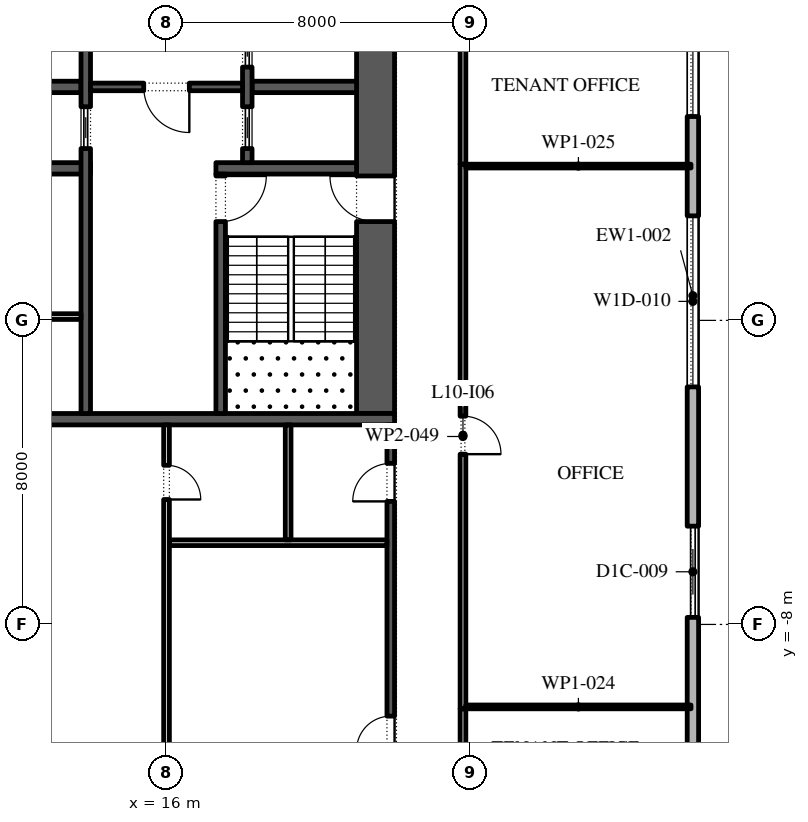
"""IFC4 building model, lengths in metres.
Left out: names, types, materials, properties, quantities, classifications, styles, units other than length and angle.
Written with IfcOpenShell. Run it as: python <this file> out.ifc"""

import sys

from ifc_helpers import new_model, si_unit, direction, frame, frame_2d, origin, place, context, subcontext, project, spatial, rectangle, extrude, element, fill, save


model = new_model("IFC4")
c1 = context("Model", 3, precision=1e-05, world=origin(), true_north=direction((0.0, 1.0)))
c2 = subcontext(c1, "Body", "Model", "MODEL_VIEW")
j1 = project(units=[si_unit("LENGTHUNIT", "METRE"), si_unit("PLANEANGLEUNIT", "RADIAN")], contexts=[c1])
p1 = place(None, origin())
s1 = spatial("IfcSite", under=j1, at=p1, CompositionType="ELEMENT")
p2 = place(p1, origin())
s2 = spatial("IfcBuilding", under=s1, at=p2, CompositionType="ELEMENT")
p3 = place(p2, frame((0.0, 0.0, 52.2)))
s3 = spatial("IfcBuildingStorey", under=s2, at=p3, CompositionType="ELEMENT", Elevation=52.2)
p4 = place(p3, frame((29.85, -24.1, 0.0), z_axis=(0.0, 0.0, 1.0), x_axis=(0.0, 1.0, 0.0)))
e1 = element("IfcWall", 1, at=p4, inside=s3, PredefinedType="STANDARD", context=c2, shape_type="SweptSolid", body=[
    extrude(rectangle(XDim=49.5, YDim=0.3, at=frame_2d((24.75, 0.0))), origin(), (0.0, 0.0, 1.0), 4.0),
])
p5 = place(p4, frame((1.157, 0.0, 0.45)))
e2 = element("IfcOpeningElement", 2, at=p5, cuts=e1, PredefinedType="OPENING", context=c2, shape_type="SweptSolid", body=[
    extrude(rectangle(XDim=4.5, YDim=3.05, at=frame_2d((2.25, 1.525))), frame((0.0, 0.16, 0.0), z_axis=(0.0, -1.0, 0.0), x_axis=(1.0, 0.0, 0.0)), (0.0, 0.0, 1.0), 0.32),
])
p6 = place(p4, frame((8.121, 0.0, 0.45)))
e3 = element("IfcOpeningElement", 3, at=p6, cuts=e1, PredefinedType="OPENING", context=c2, shape_type="SweptSolid", body=[
    extrude(rectangle(XDim=4.5, YDim=2.825, at=frame_2d((2.25, 1.413))), frame((0.0, 0.16, 0.0), z_axis=(0.0, -1.0, 0.0), x_axis=(1.0, 0.0, 0.0)), (0.0, 0.0, 1.0), 0.32),
])
p7 = place(p4, frame((16.286, 0.0, 0.0)))
e4 = element("IfcOpeningElement", 4, at=p7, cuts=e1, PredefinedType="OPENING", context=c2, shape_type="SweptSolid", body=[
    extrude(rectangle(XDim=2.4, YDim=3.325, at=frame_2d((1.2, 1.663))), frame((0.0, 0.16, 0.0), z_axis=(0.0, -1.0, 0.0), x_axis=(1.0, 0.0, 0.0)), (0.0, 0.0, 1.0), 0.32),
])
p8 = place(p4, frame((22.35, 0.0, 0.45)))
e5 = element("IfcOpeningElement", 5, at=p8, cuts=e1, PredefinedType="OPENING", context=c2, shape_type="SweptSolid", body=[
    extrude(rectangle(XDim=4.5, YDim=2.875, at=frame_2d((2.25, 1.438))), frame((0.0, 0.16, 0.0), z_axis=(0.0, -1.0, 0.0), x_axis=(1.0, 0.0, 0.0)), (0.0, 0.0, 1.0), 0.32),
])
p9 = place(p4, frame((29.464, 0.0, 0.45)))
e6 = element("IfcOpeningElement", 6, at=p9, cuts=e1, PredefinedType="OPENING", context=c2, shape_type="SweptSolid", body=[
    extrude(rectangle(XDim=4.5, YDim=2.875, at=frame_2d((2.25, 1.438))), frame((0.0, 0.16, 0.0), z_axis=(0.0, -1.0, 0.0), x_axis=(1.0, 0.0, 0.0)), (0.0, 0.0, 1.0), 0.32),
])
p10 = place(p4, frame((36.579, 0.0, 0.45)))
e7 = element("IfcOpeningElement", 7, at=p10, cuts=e1, PredefinedType="OPENING", context=c2, shape_type="SweptSolid", body=[
    extrude(rectangle(XDim=4.5, YDim=3.05, at=frame_2d((2.25, 1.525))), frame((0.0, 0.16, 0.0), z_axis=(0.0, -1.0, 0.0), x_axis=(1.0, 0.0, 0.0)), (0.0, 0.0, 1.0), 0.32),
])
p11 = place(p4, frame((44.743, 0.0, 0.0)))
e8 = element("IfcOpeningElement", 8, at=p11, cuts=e1, PredefinedType="OPENING", context=c2, shape_type="SweptSolid", body=[
    extrude(rectangle(XDim=2.4, YDim=3.325, at=frame_2d((1.2, 1.663))), frame((0.0, 0.16, 0.0), z_axis=(0.0, -1.0, 0.0), x_axis=(1.0, 0.0, 0.0)), (0.0, 0.0, 1.0), 0.32),
])
p12 = place(p3, frame((21.5, -2.45, 0.0), z_axis=(0.0, 0.0, 1.0), x_axis=(0.0, 1.0, 0.0)))
e9 = element("IfcWall", 9, at=p12, inside=s3, PredefinedType="SHEAR", context=c2, shape_type="SweptSolid", body=[
    extrude(rectangle(XDim=27.9, YDim=1.0, at=frame_2d((13.95, 0.0))), origin(), (0.0, 0.0, 1.0), 4.0),
])
p13 = place(p12, frame((5.05, 0.0, 0.0)))
e10 = element("IfcOpeningElement", 10, at=p13, cuts=e9, PredefinedType="OPENING", context=c2, shape_type="SweptSolid", body=[
    extrude(rectangle(XDim=1.2, YDim=2.1, at=frame_2d((0.6, 1.05))), frame((0.0, 0.51, 0.0), z_axis=(0.0, -1.0, 0.0), x_axis=(1.0, 0.0, 0.0)), (0.0, 0.0, 1.0), 1.02),
])
p14 = place(p12, frame((21.65, 0.0, 0.0)))
e11 = element("IfcOpeningElement", 11, at=p14, cuts=e9, PredefinedType="OPENING", context=c2, shape_type="SweptSolid", body=[
    extrude(rectangle(XDim=1.2, YDim=2.1, at=frame_2d((0.6, 1.05))), frame((0.0, 0.51, 0.0), z_axis=(0.0, -1.0, 0.0), x_axis=(1.0, 0.0, 0.0)), (0.0, 0.0, 1.0), 1.02),
])
p15 = place(p3, frame((10.0, -2.6, 0.0), z_axis=(0.0, 0.0, 1.0), x_axis=(1.0, 0.0, 0.0)))
e12 = element("IfcWall", 12, at=p15, inside=s3, PredefinedType="SHEAR", context=c2, shape_type="SweptSolid", body=[
    extrude(rectangle(XDim=12.0, YDim=0.3, at=frame_2d((6.0, 0.0))), origin(), (0.0, 0.0, 1.0), 4.0),
])
p16 = place(p3, frame((17.3, 4.0, 0.0), z_axis=(0.0, 0.0, 1.0), x_axis=(1.0, 0.0, 0.0)))
e13 = element("IfcWall", 13, at=p16, inside=s3, PredefinedType="SHEAR", context=c2, shape_type="SweptSolid", body=[
    extrude(rectangle(XDim=3.7, YDim=0.3, at=frame_2d((1.85, 0.0))), origin(), (0.0, 0.0, 1.0), 4.0),
])
p17 = place(p3, frame((17.425, -2.45, 0.0), z_axis=(0.0, 0.0, 1.0), x_axis=(0.0, 1.0, 0.0)))
e14 = element("IfcWall", 14, at=p17, inside=s3, PredefinedType="SHEAR", context=c2, shape_type="SweptSolid", body=[
    extrude(rectangle(XDim=6.3, YDim=0.25, at=frame_2d((3.15, 0.0))), origin(), (0.0, 0.0, 1.0), 4.0),
])
p18 = place(p17, frame((5.05, 0.0, 0.0)))
e15 = element("IfcOpeningElement", 15, at=p18, cuts=e14, PredefinedType="OPENING", context=c2, shape_type="SweptSolid", body=[
    extrude(rectangle(XDim=1.2, YDim=2.1, at=frame_2d((0.6, 1.05))), frame((0.0, 0.135, 0.0), z_axis=(0.0, -1.0, 0.0), x_axis=(1.0, 0.0, 0.0)), (0.0, 0.0, 1.0), 0.27),
])
p19 = place(p3, frame((18.25, 6.143, 0.0), z_axis=(0.0, 0.0, 1.0), x_axis=(1.0, 0.0, 0.0)))
e16 = element("IfcWall", 16, at=p19, inside=s3, PredefinedType="SHEAR", context=c2, shape_type="SweptSolid", body=[
    extrude(rectangle(XDim=2.75, YDim=0.3, at=frame_2d((1.375, 0.0))), origin(), (0.0, 0.0, 1.0), 4.0),
])
p20 = place(p3, frame((18.125, 4.15, 0.0), z_axis=(0.0, 0.0, 1.0), x_axis=(0.0, 1.0, 0.0)))
e17 = element("IfcWall", 17, at=p20, inside=s3, PredefinedType="SHEAR", context=c2, shape_type="SweptSolid", body=[
    extrude(rectangle(XDim=14.7, YDim=0.25, at=frame_2d((7.35, 0.0))), origin(), (0.0, 0.0, 1.0), 4.0),
])
p21 = place(p20, frame((0.371, 0.0, 0.0)))
e18 = element("IfcOpeningElement", 18, at=p21, cuts=e17, PredefinedType="OPENING", context=c2, shape_type="SweptSolid", body=[
    extrude(rectangle(XDim=1.1, YDim=2.1, at=frame_2d((0.55, 1.05))), frame((0.0, 0.135, 0.0), z_axis=(0.0, -1.0, 0.0), x_axis=(1.0, 0.0, 0.0)), (0.0, 0.0, 1.0), 0.27),
])
p22 = place(p20, frame((2.514, 0.0, 0.0)))
e19 = element("IfcOpeningElement", 19, at=p22, cuts=e17, PredefinedType="OPENING", context=c2, shape_type="SweptSolid", body=[
    extrude(rectangle(XDim=1.1, YDim=2.1, at=frame_2d((0.55, 1.05))), frame((0.0, 0.135, 0.0), z_axis=(0.0, -1.0, 0.0), x_axis=(1.0, 0.0, 0.0)), (0.0, 0.0, 1.0), 0.27),
])
p23 = place(p20, frame((4.657, 0.0, 0.0)))
e20 = element("IfcOpeningElement", 20, at=p23, cuts=e17, PredefinedType="OPENING", context=c2, shape_type="SweptSolid", body=[
    extrude(rectangle(XDim=1.1, YDim=2.1, at=frame_2d((0.55, 1.05))), frame((0.0, 0.135, 0.0), z_axis=(0.0, -1.0, 0.0), x_axis=(1.0, 0.0, 0.0)), (0.0, 0.0, 1.0), 0.27),
])
p24 = place(p20, frame((6.8, 0.0, 0.0)))
e21 = element("IfcOpeningElement", 21, at=p24, cuts=e17, PredefinedType="OPENING", context=c2, shape_type="SweptSolid", body=[
    extrude(rectangle(XDim=1.1, YDim=2.1, at=frame_2d((0.55, 1.05))), frame((0.0, 0.135, 0.0), z_axis=(0.0, -1.0, 0.0), x_axis=(1.0, 0.0, 0.0)), (0.0, 0.0, 1.0), 0.27),
])
p25 = place(p20, frame((8.943, 0.0, 0.0)))
e22 = element("IfcOpeningElement", 22, at=p25, cuts=e17, PredefinedType="OPENING", context=c2, shape_type="SweptSolid", body=[
    extrude(rectangle(XDim=1.1, YDim=2.1, at=frame_2d((0.55, 1.05))), frame((0.0, 0.135, 0.0), z_axis=(0.0, -1.0, 0.0), x_axis=(1.0, 0.0, 0.0)), (0.0, 0.0, 1.0), 0.27),
])
p26 = place(p20, frame((11.086, 0.0, 0.0)))
e23 = element("IfcOpeningElement", 23, at=p26, cuts=e17, PredefinedType="OPENING", context=c2, shape_type="SweptSolid", body=[
    extrude(rectangle(XDim=1.1, YDim=2.1, at=frame_2d((0.55, 1.05))), frame((0.0, 0.135, 0.0), z_axis=(0.0, -1.0, 0.0), x_axis=(1.0, 0.0, 0.0)), (0.0, 0.0, 1.0), 0.27),
])
p27 = place(p20, frame((13.229, 0.0, 0.0)))
e24 = element("IfcOpeningElement", 24, at=p27, cuts=e17, PredefinedType="OPENING", context=c2, shape_type="SweptSolid", body=[
    extrude(rectangle(XDim=1.1, YDim=2.1, at=frame_2d((0.55, 1.05))), frame((0.0, 0.135, 0.0), z_axis=(0.0, -1.0, 0.0), x_axis=(1.0, 0.0, 0.0)), (0.0, 0.0, 1.0), 0.27),
])
p28 = place(p3, frame((11.0, 4.0, 0.0), z_axis=(0.0, 0.0, 1.0), x_axis=(1.0, 0.0, 0.0)))
e25 = element("IfcWall", 25, at=p28, inside=s3, PredefinedType="SHEAR", context=c2, shape_type="SweptSolid", body=[
    extrude(rectangle(XDim=3.0, YDim=0.3, at=frame_2d((1.5, 0.0))), origin(), (0.0, 0.0, 1.0), 4.0),
])
p29 = place(p3, frame((11.0, 6.143, 0.0), z_axis=(0.0, 0.0, 1.0), x_axis=(1.0, 0.0, 0.0)))
e26 = element("IfcWall", 26, at=p29, inside=s3, PredefinedType="SHEAR", context=c2, shape_type="SweptSolid", body=[
    extrude(rectangle(XDim=2.75, YDim=0.3, at=frame_2d((1.375, 0.0))), origin(), (0.0, 0.0, 1.0), 4.0),
])
p30 = place(p3, frame((13.875, -2.45, 0.0), z_axis=(0.0, 0.0, 1.0), x_axis=(0.0, 1.0, 0.0)))
e27 = element("IfcWall", 27, at=p30, inside=s3, PredefinedType="SHEAR", context=c2, shape_type="SweptSolid", body=[
    extrude(rectangle(XDim=21.3, YDim=0.25, at=frame_2d((10.65, 0.0))), origin(), (0.0, 0.0, 1.0), 4.0),
])
p31 = place(p30, frame((10.396, 0.0, 0.0)))
e28 = element("IfcOpeningElement", 28, at=p31, cuts=e27, PredefinedType="OPENING", context=c2, shape_type="SweptSolid", body=[
    extrude(rectangle(XDim=0.9, YDim=2.1, at=frame_2d((0.45, 1.05))), frame((0.0, 0.135, 0.0), z_axis=(0.0, -1.0, 0.0), x_axis=(1.0, 0.0, 0.0)), (0.0, 0.0, 1.0), 0.27),
])
p32 = place(p30, frame((14.6, 0.0, 0.0)))
e29 = element("IfcOpeningElement", 29, at=p32, cuts=e27, PredefinedType="OPENING", context=c2, shape_type="SweptSolid", body=[
    extrude(rectangle(XDim=0.9, YDim=2.1, at=frame_2d((0.45, 1.05))), frame((0.0, 0.135, 0.0), z_axis=(0.0, -1.0, 0.0), x_axis=(1.0, 0.0, 0.0)), (0.0, 0.0, 1.0), 0.27),
])
p33 = place(p30, frame((18.775, 0.0, 0.0)))
e30 = element("IfcOpeningElement", 30, at=p33, cuts=e27, PredefinedType="OPENING", context=c2, shape_type="SweptSolid", body=[
    extrude(rectangle(XDim=0.9, YDim=2.1, at=frame_2d((0.45, 1.05))), frame((0.0, 0.135, 0.0), z_axis=(0.0, -1.0, 0.0), x_axis=(1.0, 0.0, 0.0)), (0.0, 0.0, 1.0), 0.27),
])
p34 = place(p30, frame((6.971, 0.0, 0.0)))
e31 = element("IfcOpeningElement", 31, at=p34, cuts=e27, PredefinedType="OPENING", context=c2, shape_type="SweptSolid", body=[
    extrude(rectangle(XDim=1.1, YDim=2.1, at=frame_2d((0.55, 1.05))), frame((0.0, 0.135, 0.0), z_axis=(0.0, -1.0, 0.0), x_axis=(1.0, 0.0, 0.0)), (0.0, 0.0, 1.0), 0.27),
])
p35 = place(p3, frame((14.0, 6.143, 0.0), z_axis=(0.0, 0.0, 1.0), x_axis=(1.0, 0.0, 0.0)))
e32 = element("IfcWall", 32, at=p35, inside=s3, PredefinedType="SHEAR", context=c2, shape_type="SweptSolid", body=[
    extrude(rectangle(XDim=4.0, YDim=0.2, at=frame_2d((2.0, 0.0))), origin(), (0.0, 0.0, 1.0), 4.0),
])
p36 = place(p35, frame((1.4, 0.0, 0.0)))
e33 = element("IfcOpeningElement", 33, at=p36, cuts=e32, PredefinedType="OPENING", context=c2, shape_type="SweptSolid", body=[
    extrude(rectangle(XDim=1.2, YDim=2.1, at=frame_2d((0.6, 1.05))), frame((0.0, 0.11, 0.0), z_axis=(0.0, -1.0, 0.0), x_axis=(1.0, 0.0, 0.0)), (0.0, 0.0, 1.0), 0.22),
])
p37 = place(p3, frame((11.0, 0.1, 0.0), z_axis=(0.0, 0.0, 1.0), x_axis=(1.0, 0.0, 0.0)))
e34 = element("IfcWall", 34, at=p37, inside=s3, PredefinedType="PARTITIONING", context=c2, shape_type="SweptSolid", body=[
    extrude(rectangle(XDim=2.75, YDim=0.15, at=frame_2d((1.375, 0.0))), origin(), (0.0, 0.0, 1.0), 4.0),
])
p38 = place(p3, frame((21.9, -15.8, 0.0), z_axis=(0.0, 0.0, 1.0), x_axis=(0.0, 1.0, 0.0)))
e35 = element("IfcWall", 35, at=p38, inside=s3, PredefinedType="SHEAR", context=c2, shape_type="SweptSolid", body=[
    extrude(rectangle(XDim=13.05, YDim=0.2, at=frame_2d((6.525, 0.0))), origin(), (0.0, 0.0, 1.0), 4.0),
])
p39 = place(p38, frame((4.488, 0.0, 0.0)))
e36 = element("IfcOpeningElement", 36, at=p39, cuts=e35, PredefinedType="OPENING", context=c2, shape_type="SweptSolid", body=[
    extrude(rectangle(XDim=0.9, YDim=2.1, at=frame_2d((0.45, 1.05))), frame((0.0, 0.11, 0.0), z_axis=(0.0, -1.0, 0.0), x_axis=(1.0, 0.0, 0.0)), (0.0, 0.0, 1.0), 0.22),
])
p40 = place(p38, frame((11.038, 0.0, 0.0)))
e37 = element("IfcOpeningElement", 37, at=p40, cuts=e35, PredefinedType="OPENING", context=c2, shape_type="SweptSolid", body=[
    extrude(rectangle(XDim=1.0, YDim=2.1, at=frame_2d((0.5, 1.05))), frame((0.0, 0.11, 0.0), z_axis=(0.0, -1.0, 0.0), x_axis=(1.0, 0.0, 0.0)), (0.0, 0.0, 1.0), 0.22),
])
p41 = place(p3, frame((16.0, -15.8, 0.0), z_axis=(0.0, 0.0, 1.0), x_axis=(0.0, 1.0, 0.0)))
e38 = element("IfcWall", 38, at=p41, inside=s3, PredefinedType="PARTITIONING", context=c2, shape_type="SweptSolid", body=[
    extrude(rectangle(XDim=13.05, YDim=0.15, at=frame_2d((6.525, 0.0))), origin(), (0.0, 0.0, 1.0), 4.0),
])
p42 = place(p41, frame((11.087, 0.0, 0.0)))
e39 = element("IfcOpeningElement", 39, at=p42, cuts=e38, PredefinedType="OPENING", context=c2, shape_type="SweptSolid", body=[
    extrude(rectangle(XDim=0.9, YDim=2.1, at=frame_2d((0.45, 1.05))), frame((0.0, 0.085, 0.0), z_axis=(0.0, -1.0, 0.0), x_axis=(1.0, 0.0, 0.0)), (0.0, 0.0, 1.0), 0.17),
])
p43 = place(p3, frame((16.075, -5.85, 0.0), z_axis=(0.0, 0.0, 1.0), x_axis=(1.0, 0.0, 0.0)))
e40 = element("IfcWall", 40, at=p43, inside=s3, PredefinedType="PARTITIONING", context=c2, shape_type="SweptSolid", body=[
    extrude(rectangle(XDim=5.725, YDim=0.15, at=frame_2d((2.863, 0.0))), origin(), (0.0, 0.0, 1.0), 4.0),
])
p44 = place(p3, frame((19.2, -5.775, 0.0), z_axis=(0.0, 0.0, 1.0), x_axis=(0.0, 1.0, 0.0)))
e41 = element("IfcWall", 41, at=p44, inside=s3, PredefinedType="PARTITIONING", context=c2, shape_type="SweptSolid", body=[
    extrude(rectangle(XDim=3.025, YDim=0.15, at=frame_2d((1.512, 0.0))), origin(), (0.0, 0.0, 1.0), 4.0),
])
p45 = place(p3, frame((23.8, -10.22, 0.0), z_axis=(0.0, 0.0, 1.0), x_axis=(0.0, -1.0, 0.0)))
e42 = element("IfcWall", 42, at=p45, inside=s3, PredefinedType="PARTITIONING", context=c2, shape_type="SweptSolid", body=[
    extrude(rectangle(XDim=7.12, YDim=0.15, at=frame_2d((3.56, 0.0))), origin(), (0.0, 0.0, 1.0), 4.0),
])
p46 = place(p45, frame((4.42, 0.0, 0.0)))
e43 = element("IfcOpeningElement", 43, at=p46, cuts=e42, PredefinedType="OPENING", context=c2, shape_type="SweptSolid", body=[
    extrude(rectangle(XDim=1.0, YDim=2.1, at=frame_2d((0.5, 1.05))), frame((0.0, 0.085, 0.0), z_axis=(0.0, -1.0, 0.0), x_axis=(1.0, 0.0, 0.0)), (0.0, 0.0, 1.0), 0.17),
])
p47 = place(p3, frame((23.8, 4.11, 0.0), z_axis=(0.0, 0.0, 1.0), x_axis=(0.0, -1.0, 0.0)))
e44 = element("IfcWall", 44, at=p47, inside=s3, PredefinedType="PARTITIONING", context=c2, shape_type="SweptSolid", body=[
    extrude(rectangle(XDim=14.33, YDim=0.15, at=frame_2d((7.165, 0.0))), origin(), (0.0, 0.0, 1.0), 4.0),
])
p48 = place(p47, frame((6.63, 0.0, 0.0)))
e45 = element("IfcOpeningElement", 45, at=p48, cuts=e44, PredefinedType="OPENING", context=c2, shape_type="SweptSolid", body=[
    extrude(rectangle(XDim=1.0, YDim=2.1, at=frame_2d((0.5, 1.05))), frame((0.0, 0.085, 0.0), z_axis=(0.0, -1.0, 0.0), x_axis=(1.0, 0.0, 0.0)), (0.0, 0.0, 1.0), 0.17),
])
p49 = place(p3, frame((23.8, 11.12, 0.0), z_axis=(0.0, 0.0, 1.0), x_axis=(0.0, -1.0, 0.0)))
e46 = element("IfcWall", 46, at=p49, inside=s3, PredefinedType="PARTITIONING", context=c2, shape_type="SweptSolid", body=[
    extrude(rectangle(XDim=7.01, YDim=0.15, at=frame_2d((3.505, 0.0))), origin(), (0.0, 0.0, 1.0), 4.0),
])
p50 = place(p49, frame((2.41, 0.0, 0.0)))
e47 = element("IfcOpeningElement", 47, at=p50, cuts=e46, PredefinedType="OPENING", context=c2, shape_type="SweptSolid", body=[
    extrude(rectangle(XDim=1.0, YDim=2.1, at=frame_2d((0.5, 1.05))), frame((0.0, 0.085, 0.0), z_axis=(0.0, -1.0, 0.0), x_axis=(1.0, 0.0, 0.0)), (0.0, 0.0, 1.0), 0.17),
])
for number, where, z_axis, x_axis in (
    (48, (29.8, -10.17, 0.0), (0.0, 0.0, 1.0), (-1.0, 0.0, 0.0)),
    (49, (29.8, 4.06, 0.0), (0.0, 0.0, 1.0), (-1.0, 0.0, 0.0)),
):
    element("IfcWall", number, at=place(p3, frame(where, z_axis=z_axis, x_axis=x_axis)), inside=s3, PredefinedType="PARTITIONING", context=c2, shape_type="SweptSolid", body=[
        extrude(rectangle(XDim=5.925, YDim=0.1, at=frame_2d((2.962, 0.0))), origin(), (0.0, 0.0, 1.0), 4.0),
    ])
p51 = place(p7, origin())
e50 = element("IfcDoor", 50, at=p51, inside=s3, OperationType="DOUBLE_DOOR_SLIDING", PredefinedType="DOOR", context=c2, shape_type="SweptSolid", body=[
    extrude(rectangle(XDim=2.4, YDim=3.325, at=frame_2d((1.2, 1.663))), frame((0.0, 0.025, 0.0), z_axis=(0.0, -1.0, 0.0), x_axis=(1.0, 0.0, 0.0)), (0.0, 0.0, 1.0), 0.05),
])
fill(e4, e50)
p52 = place(p8, origin())
e51 = element("IfcWindow", 51, at=p52, inside=s3, PartitioningType="DOUBLE_PANEL_VERTICAL", PredefinedType="WINDOW", context=c2, shape_type="SweptSolid", body=[
    extrude(rectangle(XDim=4.5, YDim=2.875, at=frame_2d((2.25, 1.438))), frame((0.0, 0.03, 0.0), z_axis=(0.0, -1.0, 0.0), x_axis=(1.0, 0.0, 0.0)), (0.0, 0.0, 1.0), 0.06),
])
fill(e5, e51)
p53 = place(p9, origin())
e52 = element("IfcWindow", 52, at=p53, inside=s3, PartitioningType="DOUBLE_PANEL_VERTICAL", PredefinedType="WINDOW", context=c2, shape_type="SweptSolid", body=[
    extrude(rectangle(XDim=4.5, YDim=2.875, at=frame_2d((2.25, 1.438))), frame((0.0, 0.03, 0.0), z_axis=(0.0, -1.0, 0.0), x_axis=(1.0, 0.0, 0.0)), (0.0, 0.0, 1.0), 0.06),
])
fill(e6, e52)
p54 = place(p21, origin())
e53 = element("IfcDoor", 53, at=p54, inside=s3, OperationType="SLIDING_TO_LEFT", PredefinedType="DOOR", context=c2, shape_type="SweptSolid", body=[
    extrude(rectangle(XDim=1.1, YDim=2.1, at=frame_2d((0.55, 1.05))), frame((0.0, 0.025, 0.0), z_axis=(0.0, -1.0, 0.0), x_axis=(1.0, 0.0, 0.0)), (0.0, 0.0, 1.0), 0.05),
])
fill(e18, e53)
p55 = place(p22, origin())
e54 = element("IfcDoor", 54, at=p55, inside=s3, OperationType="SLIDING_TO_LEFT", PredefinedType="DOOR", context=c2, shape_type="SweptSolid", body=[
    extrude(rectangle(XDim=1.1, YDim=2.1, at=frame_2d((0.55, 1.05))), frame((0.0, 0.025, 0.0), z_axis=(0.0, -1.0, 0.0), x_axis=(1.0, 0.0, 0.0)), (0.0, 0.0, 1.0), 0.05),
])
fill(e19, e54)
p56 = place(p34, origin())
e55 = element("IfcDoor", 55, at=p56, inside=s3, OperationType="SLIDING_TO_LEFT", PredefinedType="DOOR", context=c2, shape_type="SweptSolid", body=[
    extrude(rectangle(XDim=1.1, YDim=2.1, at=frame_2d((0.55, 1.05))), frame((0.0, 0.025, 0.0), z_axis=(0.0, -1.0, 0.0), x_axis=(1.0, 0.0, 0.0)), (0.0, 0.0, 1.0), 0.05),
])
fill(e31, e55)
p57 = place(p36, frame((1.2, 0.0, 0.0), z_axis=(0.0, 0.0, 1.0), x_axis=(-1.0, 0.0, 0.0)))
e56 = element("IfcDoor", 56, at=p57, inside=s3, OperationType="SINGLE_SWING_RIGHT", PredefinedType="DOOR", context=c2, shape_type="SweptSolid", body=[
    extrude(rectangle(XDim=1.2, YDim=2.1, at=frame_2d((0.6, 1.05))), frame((0.0, 0.025, 0.0), z_axis=(0.0, -1.0, 0.0), x_axis=(1.0, 0.0, 0.0)), (0.0, 0.0, 1.0), 0.05),
])
fill(e33, e56)
p58 = place(p18, frame((1.2, 0.0, 0.0), z_axis=(0.0, 0.0, 1.0), x_axis=(-1.0, 0.0, 0.0)))
e57 = element("IfcDoor", 57, at=p58, inside=s3, OperationType="SINGLE_SWING_RIGHT", PredefinedType="DOOR", context=c2, shape_type="SweptSolid", body=[
    extrude(rectangle(XDim=1.2, YDim=2.1, at=frame_2d((0.6, 1.05))), frame((0.0, 0.025, 0.0), z_axis=(0.0, -1.0, 0.0), x_axis=(1.0, 0.0, 0.0)), (0.0, 0.0, 1.0), 0.05),
])
fill(e15, e57)
p59 = place(p13, origin())
e58 = element("IfcDoor", 58, at=p59, inside=s3, OperationType="SINGLE_SWING_LEFT", PredefinedType="DOOR", context=c2, shape_type="SweptSolid", body=[
    extrude(rectangle(XDim=1.2, YDim=2.1, at=frame_2d((0.6, 1.05))), frame((0.0, 0.025, 0.0), z_axis=(0.0, -1.0, 0.0), x_axis=(1.0, 0.0, 0.0)), (0.0, 0.0, 1.0), 0.05),
])
fill(e10, e58)
p60 = place(p39, origin())
e59 = element("IfcDoor", 59, at=p60, inside=s3, OperationType="SINGLE_SWING_RIGHT", PredefinedType="DOOR", context=c2, shape_type="SweptSolid", body=[
    extrude(rectangle(XDim=0.9, YDim=2.1, at=frame_2d((0.45, 1.05))), frame((0.0, 0.1, 0.0), z_axis=(0.0, -1.0, 0.0), x_axis=(1.0, 0.0, 0.0)), (0.0, 0.0, 1.0), 0.05),
])
fill(e36, e59)
p61 = place(p40, origin())
e60 = element("IfcDoor", 60, at=p61, inside=s3, OperationType="SINGLE_SWING_RIGHT", PredefinedType="DOOR", context=c2, shape_type="SweptSolid", body=[
    extrude(rectangle(XDim=1.0, YDim=2.1, at=frame_2d((0.5, 1.05))), frame((0.0, 0.1, 0.0), z_axis=(0.0, -1.0, 0.0), x_axis=(1.0, 0.0, 0.0)), (0.0, 0.0, 1.0), 0.05),
])
fill(e37, e60)
p62 = place(p42, frame((0.9, 0.0, 0.0), z_axis=(0.0, 0.0, 1.0), x_axis=(-1.0, 0.0, 0.0)))
e61 = element("IfcDoor", 61, at=p62, inside=s3, OperationType="SINGLE_SWING_LEFT", PredefinedType="DOOR", context=c2, shape_type="SweptSolid", body=[
    extrude(rectangle(XDim=0.9, YDim=2.1, at=frame_2d((0.45, 1.05))), frame((0.0, 0.025, 0.0), z_axis=(0.0, -1.0, 0.0), x_axis=(1.0, 0.0, 0.0)), (0.0, 0.0, 1.0), 0.05),
])
fill(e39, e61)
p63 = place(p48, origin())
e62 = element("IfcDoor", 62, at=p63, inside=s3, OperationType="SINGLE_SWING_LEFT", PredefinedType="DOOR", context=c2, shape_type="SweptSolid", body=[
    extrude(rectangle(XDim=1.0, YDim=2.1, at=frame_2d((0.5, 1.05))), frame((0.0, 0.025, 0.0), z_axis=(0.0, -1.0, 0.0), x_axis=(1.0, 0.0, 0.0)), (0.0, 0.0, 1.0), 0.05),
])
fill(e45, e62)
save(model, sys.argv[1])
